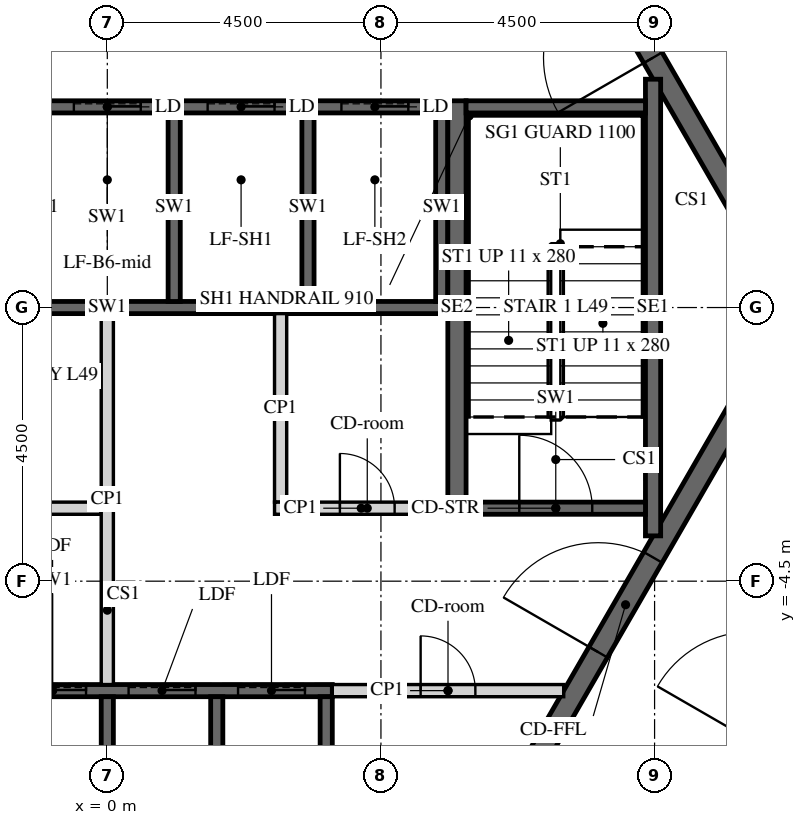
"""IFC4 building model, lengths in metres.
Left out: names, types, materials, properties, quantities, classifications, styles, units other than length and angle.
Written with IfcOpenShell. Run it as: python <this file> out.ifc"""

import sys

from ifc_helpers import new_model, si_unit, direction, frame, frame_2d, origin, place, context, subcontext, project, spatial, polyline, rectangle, outline, extrude, element, fill, save


model = new_model("IFC4")
c1 = context("Model", 3, precision=1e-05, world=origin(), true_north=direction((0.0, 1.0)))
c2 = subcontext(c1, "Body", "Model", "MODEL_VIEW")
j1 = project(units=[si_unit("LENGTHUNIT", "METRE"), si_unit("PLANEANGLEUNIT", "RADIAN")], contexts=[c1])
p1 = place(None, origin())
s1 = spatial("IfcSite", under=j1, at=p1, CompositionType="ELEMENT")
p2 = place(p1, origin())
s2 = spatial("IfcBuilding", under=s1, at=p2, CompositionType="ELEMENT")
p3 = place(p2, frame((0.0, 0.0, 207.3)))
s3 = spatial("IfcBuildingStorey", under=s2, at=p3, CompositionType="ELEMENT", Elevation=207.3)
p4 = place(p3, frame((7.361, -12.75, -0.15), z_axis=(0.0, 0.0, 1.0), x_axis=(0.50000571537, 0.866022103989, 0.0)))
e1 = element("IfcWall", 1, at=p4, inside=s3, PredefinedType="SHEAR", context=c2, shape_type="SweptSolid", body=[
    extrude(outline(polyline([(-0.144, -0.25), (14.867, -0.25), (14.578, 0.25), (0.144, 0.25), (-0.144, -0.25)])), origin(), (0.0, 0.0, 1.0), 3.9),
])
p5 = place(p4, frame((6.49, 0.0, 0.15)))
e2 = element("IfcOpeningElement", 2, at=p5, cuts=e1, PredefinedType="OPENING", context=c2, shape_type="SweptSolid", body=[
    extrude(rectangle(XDim=1.8, YDim=2.4, at=frame_2d((0.9, 1.2))), frame((0.0, 0.26, 0.0), z_axis=(0.0, -1.0, 0.0), x_axis=(1.0, 0.0, 0.0)), (0.0, 0.0, 1.0), 0.52),
])
p6 = place(p3, frame((14.722, 0.0, -0.15), z_axis=(0.0, 0.0, 1.0), x_axis=(-0.50000571537, 0.866022103989, 0.0)))
e3 = element("IfcWall", 3, at=p6, inside=s3, PredefinedType="SHEAR", context=c2, shape_type="SweptSolid", body=[
    extrude(outline(polyline([(-0.144, -0.25), (14.867, -0.25), (14.578, 0.25), (0.144, 0.25), (-0.144, -0.25)])), origin(), (0.0, 0.0, 1.0), 3.9),
])
p7 = place(p6, frame((6.432, 0.0, 0.15)))
e4 = element("IfcOpeningElement", 4, at=p7, cuts=e3, PredefinedType="OPENING", context=c2, shape_type="SweptSolid", body=[
    extrude(rectangle(XDim=1.8, YDim=2.4, at=frame_2d((0.9, 1.2))), frame((0.0, 0.26, 0.0), z_axis=(0.0, -1.0, 0.0), x_axis=(1.0, 0.0, 0.0)), (0.0, 0.0, 1.0), 0.52),
])
p8 = place(p3, frame((5.673, -9.825, -0.15), z_axis=(0.0, 0.0, 1.0), x_axis=(0.499995046907, 0.866028263435, 0.0)))
e5 = element("IfcWall", 5, at=p8, inside=s3, PredefinedType="SHEAR", context=c2, shape_type="SweptSolid", body=[
    extrude(outline(polyline([(-0.101, -0.175), (11.446, -0.175), (11.244, 0.175), (0.101, 0.175), (-0.101, -0.175)])), origin(), (0.0, 0.0, 1.0), 3.9),
])
p9 = place(p8, frame((4.801, 0.0, 0.15)))
e6 = element("IfcOpeningElement", 6, at=p9, cuts=e5, PredefinedType="OPENING", context=c2, shape_type="SweptSolid", body=[
    extrude(rectangle(XDim=1.8, YDim=2.4, at=frame_2d((0.9, 1.2))), frame((0.0, 0.185, 0.0), z_axis=(0.0, -1.0, 0.0), x_axis=(1.0, 0.0, 0.0)), (0.0, 0.0, 1.0), 0.37),
])
p10 = place(p3, frame((11.345, 0.0, -0.15), z_axis=(0.0, 0.0, 1.0), x_axis=(-0.499995046907, 0.866028263435, 0.0)))
e7 = element("IfcWall", 7, at=p10, inside=s3, PredefinedType="SHEAR", context=c2, shape_type="SweptSolid", body=[
    extrude(outline(polyline([(-0.101, -0.175), (11.446, -0.175), (11.244, 0.175), (0.101, 0.175), (-0.101, -0.175)])), origin(), (0.0, 0.0, 1.0), 3.9),
])
p11 = place(p10, frame((4.744, 0.0, 0.15)))
e8 = element("IfcOpeningElement", 8, at=p11, cuts=e7, PredefinedType="OPENING", context=c2, shape_type="SweptSolid", body=[
    extrude(rectangle(XDim=1.8, YDim=2.4, at=frame_2d((0.9, 1.2))), frame((0.0, 0.185, 0.0), z_axis=(0.0, -1.0, 0.0), x_axis=(1.0, 0.0, 0.0)), (0.0, 0.0, 1.0), 0.37),
])
p12 = place(p3, frame((-5.6, 3.3, -0.25), z_axis=(0.0, 0.0, 1.0), x_axis=(1.0, 0.0, 0.0)))
e9 = element("IfcWall", 9, at=p12, inside=s3, PredefinedType="SHEAR", context=c2, shape_type="SweptSolid", body=[
    extrude(rectangle(XDim=11.2, YDim=0.2, at=frame_2d((5.6, 0.0))), origin(), (0.0, 0.0, 1.0), 3.9),
])
p13 = place(p12, frame((0.65, 0.0, 0.25)))
e10 = element("IfcOpeningElement", 10, at=p13, cuts=e9, PredefinedType="OPENING", context=c2, shape_type="SweptSolid", body=[
    extrude(rectangle(XDim=1.1, YDim=2.1, at=frame_2d((0.55, 1.05))), frame((0.0, 0.11, 0.0), z_axis=(0.0, -1.0, 0.0), x_axis=(1.0, 0.0, 0.0)), (0.0, 0.0, 1.0), 0.22),
])
p14 = place(p12, frame((2.85, 0.0, 0.25)))
e11 = element("IfcOpeningElement", 11, at=p14, cuts=e9, PredefinedType="OPENING", context=c2, shape_type="SweptSolid", body=[
    extrude(rectangle(XDim=1.1, YDim=2.1, at=frame_2d((0.55, 1.05))), frame((0.0, 0.11, 0.0), z_axis=(0.0, -1.0, 0.0), x_axis=(1.0, 0.0, 0.0)), (0.0, 0.0, 1.0), 0.22),
])
p15 = place(p12, frame((5.05, 0.0, 0.25)))
e12 = element("IfcOpeningElement", 12, at=p15, cuts=e9, PredefinedType="OPENING", context=c2, shape_type="SweptSolid", body=[
    extrude(rectangle(XDim=1.1, YDim=2.1, at=frame_2d((0.55, 1.05))), frame((0.0, 0.11, 0.0), z_axis=(0.0, -1.0, 0.0), x_axis=(1.0, 0.0, 0.0)), (0.0, 0.0, 1.0), 0.22),
])
p16 = place(p12, frame((7.25, 0.0, 0.25)))
e13 = element("IfcOpeningElement", 13, at=p16, cuts=e9, PredefinedType="OPENING", context=c2, shape_type="SweptSolid", body=[
    extrude(rectangle(XDim=1.1, YDim=2.1, at=frame_2d((0.55, 1.05))), frame((0.0, 0.11, 0.0), z_axis=(0.0, -1.0, 0.0), x_axis=(1.0, 0.0, 0.0)), (0.0, 0.0, 1.0), 0.22),
])
p17 = place(p12, frame((9.45, 0.0, 0.25)))
e14 = element("IfcOpeningElement", 14, at=p17, cuts=e9, PredefinedType="OPENING", context=c2, shape_type="SweptSolid", body=[
    extrude(rectangle(XDim=1.1, YDim=2.1, at=frame_2d((0.55, 1.05))), frame((0.0, 0.11, 0.0), z_axis=(0.0, -1.0, 0.0), x_axis=(1.0, 0.0, 0.0)), (0.0, 0.0, 1.0), 0.22),
])
p18 = place(p3, frame((-5.6, 0.0, -0.25), z_axis=(0.0, 0.0, 1.0), x_axis=(1.0, 0.0, 0.0)))
e15 = element("IfcWall", 15, at=p18, inside=s3, PredefinedType="SHEAR", context=c2, shape_type="SweptSolid", body=[
    extrude(rectangle(XDim=11.2, YDim=0.2, at=frame_2d((5.6, 0.0))), origin(), (0.0, 0.0, 1.0), 3.9),
])
for number, where, z_axis, x_axis in (
    (16, (1.1, 0.1, -0.25), (0.0, 0.0, 1.0), (0.0, 1.0, 0.0)),
    (17, (3.3, 0.1, -0.25), (0.0, 0.0, 1.0), (0.0, 1.0, 0.0)),
    (18, (5.5, 0.1, -0.25), (0.0, 0.0, 1.0), (0.0, 1.0, 0.0)),
):
    element("IfcWall", number, at=place(p3, frame(where, z_axis=z_axis, x_axis=x_axis)), inside=s3, PredefinedType="SHEAR", context=c2, shape_type="SweptSolid", body=[
        extrude(rectangle(XDim=3.1, YDim=0.2, at=frame_2d((1.55, 0.0))), origin(), (0.0, 0.0, 1.0), 3.9),
    ])
p19 = place(p3, frame((-5.5, -6.3, -0.25), z_axis=(0.0, 0.0, 1.0), x_axis=(1.0, 0.0, 0.0)))
e19 = element("IfcWall", 19, at=p19, inside=s3, PredefinedType="SHEAR", context=c2, shape_type="SweptSolid", body=[
    extrude(rectangle(XDim=9.2, YDim=0.2, at=frame_2d((4.6, 0.0))), origin(), (0.0, 0.0, 1.0), 3.9),
])
p20 = place(p19, frame((0.45, 0.0, 0.25)))
e20 = element("IfcOpeningElement", 20, at=p20, cuts=e19, PredefinedType="OPENING", context=c2, shape_type="SweptSolid", body=[
    extrude(rectangle(XDim=1.1, YDim=2.1, at=frame_2d((0.55, 1.05))), frame((0.0, 0.11, 0.0), z_axis=(0.0, -1.0, 0.0), x_axis=(1.0, 0.0, 0.0)), (0.0, 0.0, 1.0), 0.22),
])
p21 = place(p19, frame((2.25, 0.0, 0.25)))
e21 = element("IfcOpeningElement", 21, at=p21, cuts=e19, PredefinedType="OPENING", context=c2, shape_type="SweptSolid", body=[
    extrude(rectangle(XDim=1.1, YDim=2.1, at=frame_2d((0.55, 1.05))), frame((0.0, 0.11, 0.0), z_axis=(0.0, -1.0, 0.0), x_axis=(1.0, 0.0, 0.0)), (0.0, 0.0, 1.0), 0.22),
])
p22 = place(p19, frame((4.05, 0.0, 0.25)))
e22 = element("IfcOpeningElement", 22, at=p22, cuts=e19, PredefinedType="OPENING", context=c2, shape_type="SweptSolid", body=[
    extrude(rectangle(XDim=1.1, YDim=2.1, at=frame_2d((0.55, 1.05))), frame((0.0, 0.11, 0.0), z_axis=(0.0, -1.0, 0.0), x_axis=(1.0, 0.0, 0.0)), (0.0, 0.0, 1.0), 0.22),
])
p23 = place(p19, frame((5.85, 0.0, 0.25)))
e23 = element("IfcOpeningElement", 23, at=p23, cuts=e19, PredefinedType="OPENING", context=c2, shape_type="SweptSolid", body=[
    extrude(rectangle(XDim=1.1, YDim=2.1, at=frame_2d((0.55, 1.05))), frame((0.0, 0.11, 0.0), z_axis=(0.0, -1.0, 0.0), x_axis=(1.0, 0.0, 0.0)), (0.0, 0.0, 1.0), 0.22),
])
p24 = place(p19, frame((7.65, 0.0, 0.25)))
e24 = element("IfcOpeningElement", 24, at=p24, cuts=e19, PredefinedType="OPENING", context=c2, shape_type="SweptSolid", body=[
    extrude(rectangle(XDim=1.1, YDim=2.1, at=frame_2d((0.55, 1.05))), frame((0.0, 0.11, 0.0), z_axis=(0.0, -1.0, 0.0), x_axis=(1.0, 0.0, 0.0)), (0.0, 0.0, 1.0), 0.22),
])
for number, where, z_axis, x_axis in (
    (25, (0.0, -9.3, -0.25), (0.0, 0.0, 1.0), (0.0, 1.0, 0.0)),
    (26, (1.8, -9.3, -0.25), (0.0, 0.0, 1.0), (0.0, 1.0, 0.0)),
    (27, (3.6, -9.3, -0.25), (0.0, 0.0, 1.0), (0.0, 1.0, 0.0)),
):
    element("IfcWall", number, at=place(p3, frame(where, z_axis=z_axis, x_axis=x_axis)), inside=s3, PredefinedType="SHEAR", context=c2, shape_type="SweptSolid", body=[
        extrude(rectangle(XDim=2.9, YDim=0.2, at=frame_2d((1.45, 0.0))), origin(), (0.0, 0.0, 1.0), 3.9),
    ])
p25 = place(p3, frame((-5.6, -3.3, 0.0), z_axis=(0.0, 0.0, 1.0), x_axis=(1.0, 0.0, 0.0)))
e28 = element("IfcWall", 28, at=p25, inside=s3, PredefinedType="PARTITIONING", context=c2, shape_type="SweptSolid", body=[
    extrude(rectangle(XDim=5.5, YDim=0.2, at=frame_2d((2.75, 0.0))), origin(), (0.0, 0.0, 1.0), 3.65),
])
p26 = place(p25, frame((2.3, 0.0, 0.0)))
e29 = element("IfcOpeningElement", 29, at=p26, cuts=e28, PredefinedType="OPENING", context=c2, shape_type="SweptSolid", body=[
    extrude(rectangle(XDim=0.9, YDim=2.1, at=frame_2d((0.45, 1.05))), frame((0.0, 0.11, 0.0), z_axis=(0.0, -1.0, 0.0), x_axis=(1.0, 0.0, 0.0)), (0.0, 0.0, 1.0), 0.22),
])
p27 = place(p3, frame((2.75, -3.3, 0.0), z_axis=(0.0, 0.0, 1.0), x_axis=(1.0, 0.0, 0.0)))
e30 = element("IfcWall", 30, at=p27, inside=s3, PredefinedType="PARTITIONING", context=c2, shape_type="SweptSolid", body=[
    extrude(rectangle(XDim=2.85, YDim=0.2, at=frame_2d((1.425, 0.0))), origin(), (0.0, 0.0, 1.0), 3.65),
])
p28 = place(p27, frame((1.075, 0.0, 0.0)))
e31 = element("IfcOpeningElement", 31, at=p28, cuts=e30, PredefinedType="OPENING", context=c2, shape_type="SweptSolid", body=[
    extrude(rectangle(XDim=0.9, YDim=2.1, at=frame_2d((0.45, 1.05))), frame((0.0, 0.11, 0.0), z_axis=(0.0, -1.0, 0.0), x_axis=(1.0, 0.0, 0.0)), (0.0, 0.0, 1.0), 0.22),
])
p29 = place(p3, frame((2.85, -3.2, 0.0), z_axis=(0.0, 0.0, 1.0), x_axis=(0.0, 1.0, 0.0)))
e32 = element("IfcWall", 32, at=p29, inside=s3, PredefinedType="PARTITIONING", context=c2, shape_type="SweptSolid", body=[
    extrude(rectangle(XDim=3.1, YDim=0.2, at=frame_2d((1.55, 0.0))), origin(), (0.0, 0.0, 1.0), 3.65),
])
p30 = place(p3, frame((0.0, -6.2, 0.0), z_axis=(0.0, 0.0, 1.0), x_axis=(0.0, 1.0, 0.0)))
e33 = element("IfcWall", 33, at=p30, inside=s3, PredefinedType="PARTITIONING", context=c2, shape_type="SweptSolid", body=[
    extrude(rectangle(XDim=6.1, YDim=0.2, at=frame_2d((3.05, 0.0))), origin(), (0.0, 0.0, 1.0), 3.65),
])
p31 = place(p3, frame((3.7, -6.3, 0.0), z_axis=(0.0, 0.0, 1.0), x_axis=(1.0, 0.0, 0.0)))
e34 = element("IfcWall", 34, at=p31, inside=s3, PredefinedType="PARTITIONING", context=c2, shape_type="SweptSolid", body=[
    extrude(rectangle(XDim=3.806, YDim=0.2, at=frame_2d((1.903, 0.0))), origin(), (0.0, 0.0, 1.0), 3.65),
])
p32 = place(p31, frame((1.453, 0.0, 0.0)))
e35 = element("IfcOpeningElement", 35, at=p32, cuts=e34, PredefinedType="OPENING", context=c2, shape_type="SweptSolid", body=[
    extrude(rectangle(XDim=0.9, YDim=2.1, at=frame_2d((0.45, 1.05))), frame((0.0, 0.11, 0.0), z_axis=(0.0, -1.0, 0.0), x_axis=(1.0, 0.0, 0.0)), (0.0, 0.0, 1.0), 0.22),
])
p33 = place(p3, frame((5.75, -3.4, -0.25), z_axis=(0.0, 0.0, 1.0), x_axis=(0.0, 1.0, 0.0)))
e36 = element("IfcWall", 36, at=p33, inside=s3, PredefinedType="SHEAR", context=c2, shape_type="SweptSolid", body=[
    extrude(rectangle(XDim=6.8, YDim=0.3, at=frame_2d((3.4, 0.0))), origin(), (0.0, 0.0, 1.0), 3.9),
])
p34 = place(p3, frame((8.975, -3.755, -0.25), z_axis=(0.0, 0.0, 1.0), x_axis=(0.0, 1.0, 0.0)))
e37 = element("IfcWall", 37, at=p34, inside=s3, PredefinedType="SHEAR", context=c2, shape_type="SweptSolid", body=[
    extrude(rectangle(XDim=7.51, YDim=0.25, at=frame_2d((3.755, 0.0))), origin(), (0.0, 0.0, 1.0), 3.9),
])
p35 = place(p3, frame((5.9, 3.3, -0.25), z_axis=(0.0, 0.0, 1.0), x_axis=(1.0, 0.0, 0.0)))
e38 = element("IfcWall", 38, at=p35, inside=s3, PredefinedType="SHEAR", context=c2, shape_type="SweptSolid", body=[
    extrude(rectangle(XDim=2.95, YDim=0.2, at=frame_2d((1.475, 0.0))), origin(), (0.0, 0.0, 1.0), 3.9),
])
p36 = place(p3, frame((5.9, -3.3, -0.25), z_axis=(0.0, 0.0, 1.0), x_axis=(1.0, 0.0, 0.0)))
e39 = element("IfcWall", 39, at=p36, inside=s3, PredefinedType="SHEAR", context=c2, shape_type="SweptSolid", body=[
    extrude(rectangle(XDim=2.95, YDim=0.2, at=frame_2d((1.475, 0.0))), origin(), (0.0, 0.0, 1.0), 3.9),
])
p37 = place(p36, frame((0.875, 0.0, 0.25)))
e40 = element("IfcOpeningElement", 40, at=p37, cuts=e39, PredefinedType="OPENING", context=c2, shape_type="SweptSolid", body=[
    extrude(rectangle(XDim=1.2, YDim=2.4, at=frame_2d((0.6, 1.2))), frame((0.0, 0.11, 0.0), z_axis=(0.0, -1.0, 0.0), x_axis=(1.0, 0.0, 0.0)), (0.0, 0.0, 1.0), 0.22),
])
p38 = place(p3, frame((17.277, 0.075, 0.0), z_axis=(0.0, 0.0, 1.0), x_axis=(-0.499988884089, 0.866031821464, 0.0)))
e41 = element("IfcWall", 41, at=p38, inside=s3, PredefinedType="PARTITIONING", context=c2, shape_type="SweptSolid", body=[
    extrude(rectangle(XDim=14.78, YDim=0.15, at=frame_2d((7.39, 0.0))), origin(), (0.0, 0.0, 1.0), 2.988),
])
p39 = place(p38, frame((1.001, 0.0, 0.0)))
e42 = element("IfcOpeningElement", 42, at=p39, cuts=e41, PredefinedType="OPENING", context=c2, shape_type="SweptSolid", body=[
    extrude(rectangle(XDim=1.0, YDim=2.1, at=frame_2d((0.5, 1.05))), frame((0.0, 0.085, 0.0), z_axis=(0.0, -1.0, 0.0), x_axis=(1.0, 0.0, 0.0)), (0.0, 0.0, 1.0), 0.17),
])
p40 = place(p38, frame((5.0, 0.0, 0.0)))
e43 = element("IfcOpeningElement", 43, at=p40, cuts=e41, PredefinedType="OPENING", context=c2, shape_type="SweptSolid", body=[
    extrude(rectangle(XDim=1.0, YDim=2.1, at=frame_2d((0.5, 1.05))), frame((0.0, 0.085, 0.0), z_axis=(0.0, -1.0, 0.0), x_axis=(1.0, 0.0, 0.0)), (0.0, 0.0, 1.0), 0.17),
])
p41 = place(p38, frame((10.79, 0.0, 0.0)))
e44 = element("IfcOpeningElement", 44, at=p41, cuts=e41, PredefinedType="OPENING", context=c2, shape_type="SweptSolid", body=[
    extrude(rectangle(XDim=1.0, YDim=2.1, at=frame_2d((0.5, 1.05))), frame((0.0, 0.085, 0.0), z_axis=(0.0, -1.0, 0.0), x_axis=(1.0, 0.0, 0.0)), (0.0, 0.0, 1.0), 0.17),
])
p42 = place(p11, origin())
e45 = element("IfcDoor", 45, at=p42, inside=s3, OperationType="DOUBLE_DOOR_SINGLE_SWING", PredefinedType="DOOR", context=c2, shape_type="SweptSolid", body=[
    extrude(rectangle(XDim=1.8, YDim=2.4, at=frame_2d((0.9, 1.2))), frame((0.0, 0.025, 0.0), z_axis=(0.0, -1.0, 0.0), x_axis=(1.0, 0.0, 0.0)), (0.0, 0.0, 1.0), 0.05),
])
fill(e8, e45)
p43 = place(p9, origin())
e46 = element("IfcDoor", 46, at=p43, inside=s3, OperationType="DOUBLE_DOOR_SINGLE_SWING", PredefinedType="DOOR", context=c2, shape_type="SweptSolid", body=[
    extrude(rectangle(XDim=1.8, YDim=2.4, at=frame_2d((0.9, 1.2))), frame((0.0, 0.025, 0.0), z_axis=(0.0, -1.0, 0.0), x_axis=(1.0, 0.0, 0.0)), (0.0, 0.0, 1.0), 0.05),
])
fill(e6, e46)
p44 = place(p28, origin())
e47 = element("IfcDoor", 47, at=p44, inside=s3, OperationType="SINGLE_SWING_LEFT", PredefinedType="DOOR", context=c2, shape_type="SweptSolid", body=[
    extrude(rectangle(XDim=0.9, YDim=2.1, at=frame_2d((0.45, 1.05))), frame((0.0, 0.025, 0.0), z_axis=(0.0, -1.0, 0.0), x_axis=(1.0, 0.0, 0.0)), (0.0, 0.0, 1.0), 0.05),
])
fill(e31, e47)
p45 = place(p32, origin())
e48 = element("IfcDoor", 48, at=p45, inside=s3, OperationType="SINGLE_SWING_LEFT", PredefinedType="DOOR", context=c2, shape_type="SweptSolid", body=[
    extrude(rectangle(XDim=0.9, YDim=2.1, at=frame_2d((0.45, 1.05))), frame((0.0, 0.025, 0.0), z_axis=(0.0, -1.0, 0.0), x_axis=(1.0, 0.0, 0.0)), (0.0, 0.0, 1.0), 0.05),
])
fill(e35, e48)
p46 = place(p37, origin())
e49 = element("IfcDoor", 49, at=p46, inside=s3, OperationType="SINGLE_SWING_LEFT", PredefinedType="DOOR", context=c2, shape_type="SweptSolid", body=[
    extrude(rectangle(XDim=1.2, YDim=2.4, at=frame_2d((0.6, 1.2))), frame((0.0, 0.025, 0.0), z_axis=(0.0, -1.0, 0.0), x_axis=(1.0, 0.0, 0.0)), (0.0, 0.0, 1.0), 0.05),
])
fill(e40, e49)
p47 = place(p15, origin())
e50 = element("IfcDoor", 50, at=p47, inside=s3, OperationType="SLIDING_TO_LEFT", PredefinedType="DOOR", context=c2, shape_type="SweptSolid", body=[
    extrude(rectangle(XDim=1.1, YDim=2.1, at=frame_2d((0.55, 1.05))), frame((0.0, 0.025, 0.0), z_axis=(0.0, -1.0, 0.0), x_axis=(1.0, 0.0, 0.0)), (0.0, 0.0, 1.0), 0.05),
])
fill(e12, e50)
p48 = place(p16, origin())
e51 = element("IfcDoor", 51, at=p48, inside=s3, OperationType="SLIDING_TO_LEFT", PredefinedType="DOOR", context=c2, shape_type="SweptSolid", body=[
    extrude(rectangle(XDim=1.1, YDim=2.1, at=frame_2d((0.55, 1.05))), frame((0.0, 0.025, 0.0), z_axis=(0.0, -1.0, 0.0), x_axis=(1.0, 0.0, 0.0)), (0.0, 0.0, 1.0), 0.05),
])
fill(e13, e51)
p49 = place(p17, origin())
e52 = element("IfcDoor", 52, at=p49, inside=s3, OperationType="SLIDING_TO_LEFT", PredefinedType="DOOR", context=c2, shape_type="SweptSolid", body=[
    extrude(rectangle(XDim=1.1, YDim=2.1, at=frame_2d((0.55, 1.05))), frame((0.0, 0.025, 0.0), z_axis=(0.0, -1.0, 0.0), x_axis=(1.0, 0.0, 0.0)), (0.0, 0.0, 1.0), 0.05),
])
fill(e14, e52)
p50 = place(p22, origin())
e53 = element("IfcDoor", 53, at=p50, inside=s3, OperationType="SLIDING_TO_LEFT", PredefinedType="DOOR", context=c2, shape_type="SweptSolid", body=[
    extrude(rectangle(XDim=1.1, YDim=2.1, at=frame_2d((0.55, 1.05))), frame((0.0, 0.025, 0.0), z_axis=(0.0, -1.0, 0.0), x_axis=(1.0, 0.0, 0.0)), (0.0, 0.0, 1.0), 0.05),
])
fill(e22, e53)
p51 = place(p23, origin())
e54 = element("IfcDoor", 54, at=p51, inside=s3, OperationType="SLIDING_TO_LEFT", PredefinedType="DOOR", context=c2, shape_type="SweptSolid", body=[
    extrude(rectangle(XDim=1.1, YDim=2.1, at=frame_2d((0.55, 1.05))), frame((0.0, 0.025, 0.0), z_axis=(0.0, -1.0, 0.0), x_axis=(1.0, 0.0, 0.0)), (0.0, 0.0, 1.0), 0.05),
])
fill(e23, e54)
p52 = place(p24, origin())
e55 = element("IfcDoor", 55, at=p52, inside=s3, OperationType="SLIDING_TO_LEFT", PredefinedType="DOOR", context=c2, shape_type="SweptSolid", body=[
    extrude(rectangle(XDim=1.1, YDim=2.1, at=frame_2d((0.55, 1.05))), frame((0.0, 0.025, 0.0), z_axis=(0.0, -1.0, 0.0), x_axis=(1.0, 0.0, 0.0)), (0.0, 0.0, 1.0), 0.05),
])
fill(e24, e55)
save(model, sys.argv[1])
